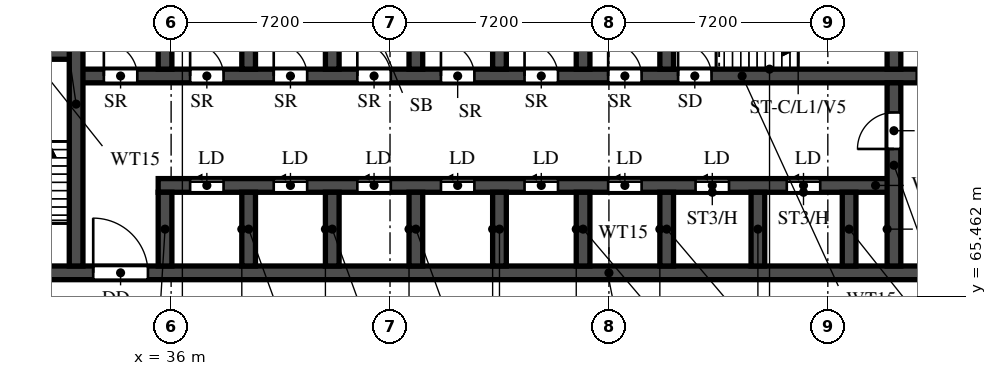
"""IFC4 building model, lengths in metres.
Left out: names, types, materials, properties, quantities, classifications, styles, units other than length and angle.
Written with IfcOpenShell. Run it as: python <this file> out.ifc"""

import sys

from ifc_helpers import new_model, si_unit, direction, frame, frame_2d, origin, place, context, subcontext, project, spatial, rectangle, extrude, element, fill, save


model = new_model("IFC4")
c1 = context("Model", 3, precision=1e-05, world=origin(), true_north=direction((0.0, 1.0)))
c2 = subcontext(c1, "Body", "Model", "MODEL_VIEW")
j1 = project(units=[si_unit("LENGTHUNIT", "METRE"), si_unit("PLANEANGLEUNIT", "RADIAN")], contexts=[c1])
p1 = place(None, origin())
s1 = spatial("IfcSite", under=j1, at=p1, CompositionType="ELEMENT")
p2 = place(p1, origin())
s2 = spatial("IfcBuilding", under=s1, at=p2, CompositionType="ELEMENT")
p3 = place(p2, origin())
s3 = spatial("IfcBuildingStorey", under=s2, at=p3, CompositionType="ELEMENT", Elevation=0.0)
p4 = place(p3, frame((29.7, 66.225, 0.0), z_axis=(0.0, 0.0, 1.0), x_axis=(1.0, 0.0, 0.0)))
e1 = element("IfcWall", 1, at=p4, inside=s3, PredefinedType="SHEAR", context=c2, shape_type="SweptSolid", body=[
    extrude(rectangle(XDim=41.4, YDim=0.45, at=frame_2d((20.7, 0.0))), origin(), (0.0, 0.0, 1.0), 7.4),
])
p5 = place(p4, frame((0.925, 0.0, 0.0)))
e2 = element("IfcOpeningElement", 2, at=p5, cuts=e1, PredefinedType="OPENING", context=c2, shape_type="SweptSolid", body=[
    extrude(rectangle(XDim=1.1, YDim=2.1, at=frame_2d((0.55, 1.05))), frame((0.0, 0.235, 0.0), z_axis=(0.0, -1.0, 0.0), x_axis=(1.0, 0.0, 0.0)), (0.0, 0.0, 1.0), 0.47),
])
p6 = place(p4, frame((3.738, 0.0, 0.0)))
e3 = element("IfcOpeningElement", 3, at=p6, cuts=e1, PredefinedType="OPENING", context=c2, shape_type="SweptSolid", body=[
    extrude(rectangle(XDim=1.8, YDim=2.1, at=frame_2d((0.9, 1.05))), frame((0.0, 0.235, 0.0), z_axis=(0.0, -1.0, 0.0), x_axis=(1.0, 0.0, 0.0)), (0.0, 0.0, 1.0), 0.47),
])
p7 = place(p3, frame((35.575, 69.1, 0.0), z_axis=(0.0, 0.0, 1.0), x_axis=(1.0, 0.0, 0.0)))
e4 = element("IfcWall", 4, at=p7, inside=s3, PredefinedType="SHEAR", context=c2, shape_type="SweptSolid", body=[
    extrude(rectangle(XDim=24.2, YDim=0.45, at=frame_2d((12.1, 0.0))), origin(), (0.0, 0.0, 1.0), 7.4),
])
p8 = place(p7, frame((1.05, 0.0, 0.0)))
e5 = element("IfcOpeningElement", 5, at=p8, cuts=e4, PredefinedType="OPENING", context=c2, shape_type="SweptSolid", body=[
    extrude(rectangle(XDim=1.1, YDim=2.1, at=frame_2d((0.55, 1.05))), frame((0.0, 0.235, 0.0), z_axis=(0.0, -1.0, 0.0), x_axis=(1.0, 0.0, 0.0)), (0.0, 0.0, 1.0), 0.47),
])
p9 = place(p7, frame((3.8, 0.0, 0.0)))
e6 = element("IfcOpeningElement", 6, at=p9, cuts=e4, PredefinedType="OPENING", context=c2, shape_type="SweptSolid", body=[
    extrude(rectangle(XDim=1.1, YDim=2.1, at=frame_2d((0.55, 1.05))), frame((0.0, 0.235, 0.0), z_axis=(0.0, -1.0, 0.0), x_axis=(1.0, 0.0, 0.0)), (0.0, 0.0, 1.0), 0.47),
])
p10 = place(p7, frame((6.55, 0.0, 0.0)))
e7 = element("IfcOpeningElement", 7, at=p10, cuts=e4, PredefinedType="OPENING", context=c2, shape_type="SweptSolid", body=[
    extrude(rectangle(XDim=1.1, YDim=2.1, at=frame_2d((0.55, 1.05))), frame((0.0, 0.235, 0.0), z_axis=(0.0, -1.0, 0.0), x_axis=(1.0, 0.0, 0.0)), (0.0, 0.0, 1.0), 0.47),
])
p11 = place(p7, frame((9.3, 0.0, 0.0)))
e8 = element("IfcOpeningElement", 8, at=p11, cuts=e4, PredefinedType="OPENING", context=c2, shape_type="SweptSolid", body=[
    extrude(rectangle(XDim=1.1, YDim=2.1, at=frame_2d((0.55, 1.05))), frame((0.0, 0.235, 0.0), z_axis=(0.0, -1.0, 0.0), x_axis=(1.0, 0.0, 0.0)), (0.0, 0.0, 1.0), 0.47),
])
p12 = place(p7, frame((12.05, 0.0, 0.0)))
e9 = element("IfcOpeningElement", 9, at=p12, cuts=e4, PredefinedType="OPENING", context=c2, shape_type="SweptSolid", body=[
    extrude(rectangle(XDim=1.1, YDim=2.1, at=frame_2d((0.55, 1.05))), frame((0.0, 0.235, 0.0), z_axis=(0.0, -1.0, 0.0), x_axis=(1.0, 0.0, 0.0)), (0.0, 0.0, 1.0), 0.47),
])
p13 = place(p7, frame((14.8, 0.0, 0.0)))
e10 = element("IfcOpeningElement", 10, at=p13, cuts=e4, PredefinedType="OPENING", context=c2, shape_type="SweptSolid", body=[
    extrude(rectangle(XDim=1.1, YDim=2.1, at=frame_2d((0.55, 1.05))), frame((0.0, 0.235, 0.0), z_axis=(0.0, -1.0, 0.0), x_axis=(1.0, 0.0, 0.0)), (0.0, 0.0, 1.0), 0.47),
])
p14 = place(p7, frame((17.675, 0.0, 0.0)))
e11 = element("IfcOpeningElement", 11, at=p14, cuts=e4, PredefinedType="OPENING", context=c2, shape_type="SweptSolid", body=[
    extrude(rectangle(XDim=1.1, YDim=2.1, at=frame_2d((0.55, 1.05))), frame((0.0, 0.235, 0.0), z_axis=(0.0, -1.0, 0.0), x_axis=(1.0, 0.0, 0.0)), (0.0, 0.0, 1.0), 0.47),
])
p15 = place(p7, frame((20.675, 0.0, 0.0)))
e12 = element("IfcOpeningElement", 12, at=p15, cuts=e4, PredefinedType="OPENING", context=c2, shape_type="SweptSolid", body=[
    extrude(rectangle(XDim=1.1, YDim=2.1, at=frame_2d((0.55, 1.05))), frame((0.0, 0.235, 0.0), z_axis=(0.0, -1.0, 0.0), x_axis=(1.0, 0.0, 0.0)), (0.0, 0.0, 1.0), 0.47),
])
p16 = place(p3, frame((32.875, 72.7, 0.0), z_axis=(0.0, 0.0, 1.0), x_axis=(1.0, 0.0, 0.0)))
e13 = element("IfcWall", 13, at=p16, inside=s3, PredefinedType="SHEAR", context=c2, shape_type="SweptSolid", body=[
    extrude(rectangle(XDim=35.05, YDim=0.45, at=frame_2d((17.525, 0.0))), origin(), (0.0, 0.0, 1.0), 7.4),
])
p17 = place(p16, frame((19.8, 0.0, 0.0)))
e14 = element("IfcOpeningElement", 14, at=p17, cuts=e13, PredefinedType="OPENING", context=c2, shape_type="SweptSolid", body=[
    extrude(rectangle(XDim=1.1, YDim=2.1, at=frame_2d((0.55, 1.05))), frame((0.0, 0.235, 0.0), z_axis=(0.0, -1.0, 0.0), x_axis=(1.0, 0.0, 0.0)), (0.0, 0.0, 1.0), 0.47),
])
p18 = place(p16, frame((27.65, 0.0, 0.0)))
e15 = element("IfcOpeningElement", 15, at=p18, cuts=e13, PredefinedType="OPENING", context=c2, shape_type="SweptSolid", body=[
    extrude(rectangle(XDim=1.1, YDim=2.1, at=frame_2d((0.55, 1.05))), frame((0.0, 0.235, 0.0), z_axis=(0.0, -1.0, 0.0), x_axis=(1.0, 0.0, 0.0)), (0.0, 0.0, 1.0), 0.47),
])
p19 = place(p16, frame((30.25, 0.0, 0.0)))
e16 = element("IfcOpeningElement", 16, at=p19, cuts=e13, PredefinedType="OPENING", context=c2, shape_type="SweptSolid", body=[
    extrude(rectangle(XDim=1.1, YDim=2.1, at=frame_2d((0.55, 1.05))), frame((0.0, 0.235, 0.0), z_axis=(0.0, -1.0, 0.0), x_axis=(1.0, 0.0, 0.0)), (0.0, 0.0, 1.0), 0.47),
])
p20 = place(p16, frame((3.75, 0.0, 0.0)))
e17 = element("IfcOpeningElement", 17, at=p20, cuts=e13, PredefinedType="OPENING", context=c2, shape_type="SweptSolid", body=[
    extrude(rectangle(XDim=1.1, YDim=2.1, at=frame_2d((0.55, 1.05))), frame((0.0, 0.235, 0.0), z_axis=(0.0, -1.0, 0.0), x_axis=(1.0, 0.0, 0.0)), (0.0, 0.0, 1.0), 0.47),
])
p21 = place(p16, frame((6.5, 0.0, 0.0)))
e18 = element("IfcOpeningElement", 18, at=p21, cuts=e13, PredefinedType="OPENING", context=c2, shape_type="SweptSolid", body=[
    extrude(rectangle(XDim=1.1, YDim=2.1, at=frame_2d((0.55, 1.05))), frame((0.0, 0.235, 0.0), z_axis=(0.0, -1.0, 0.0), x_axis=(1.0, 0.0, 0.0)), (0.0, 0.0, 1.0), 0.47),
])
p22 = place(p16, frame((9.25, 0.0, 0.0)))
e19 = element("IfcOpeningElement", 19, at=p22, cuts=e13, PredefinedType="OPENING", context=c2, shape_type="SweptSolid", body=[
    extrude(rectangle(XDim=1.1, YDim=2.1, at=frame_2d((0.55, 1.05))), frame((0.0, 0.235, 0.0), z_axis=(0.0, -1.0, 0.0), x_axis=(1.0, 0.0, 0.0)), (0.0, 0.0, 1.0), 0.47),
])
p23 = place(p16, frame((12.0, 0.0, 0.0)))
e20 = element("IfcOpeningElement", 20, at=p23, cuts=e13, PredefinedType="OPENING", context=c2, shape_type="SweptSolid", body=[
    extrude(rectangle(XDim=1.1, YDim=2.1, at=frame_2d((0.55, 1.05))), frame((0.0, 0.235, 0.0), z_axis=(0.0, -1.0, 0.0), x_axis=(1.0, 0.0, 0.0)), (0.0, 0.0, 1.0), 0.47),
])
p24 = place(p16, frame((14.75, 0.0, 0.0)))
e21 = element("IfcOpeningElement", 21, at=p24, cuts=e13, PredefinedType="OPENING", context=c2, shape_type="SweptSolid", body=[
    extrude(rectangle(XDim=1.1, YDim=2.1, at=frame_2d((0.55, 1.05))), frame((0.0, 0.235, 0.0), z_axis=(0.0, -1.0, 0.0), x_axis=(1.0, 0.0, 0.0)), (0.0, 0.0, 1.0), 0.47),
])
p25 = place(p16, frame((17.5, 0.0, 0.0)))
e22 = element("IfcOpeningElement", 22, at=p25, cuts=e13, PredefinedType="OPENING", context=c2, shape_type="SweptSolid", body=[
    extrude(rectangle(XDim=1.1, YDim=2.1, at=frame_2d((0.55, 1.05))), frame((0.0, 0.235, 0.0), z_axis=(0.0, -1.0, 0.0), x_axis=(1.0, 0.0, 0.0)), (0.0, 0.0, 1.0), 0.47),
])
p26 = place(p16, frame((0.913, 0.0, 0.0)))
e23 = element("IfcOpeningElement", 23, at=p26, cuts=e13, PredefinedType="OPENING", context=c2, shape_type="SweptSolid", body=[
    extrude(rectangle(XDim=1.1, YDim=2.1, at=frame_2d((0.55, 1.05))), frame((0.0, 0.235, 0.0), z_axis=(0.0, -1.0, 0.0), x_axis=(1.0, 0.0, 0.0)), (0.0, 0.0, 1.0), 0.47),
])
p27 = place(p3, frame((29.7, 73.475, 0.0), z_axis=(0.0, 0.0, 1.0), x_axis=(1.0, 0.0, 0.0)))
e24 = element("IfcWall", 24, at=p27, inside=s3, PredefinedType="SHEAR", context=c2, shape_type="SweptSolid", body=[
    extrude(rectangle(XDim=3.175, YDim=0.45, at=frame_2d((1.587, 0.0))), origin(), (0.0, 0.0, 1.0), 7.4),
])
p28 = place(p3, frame((32.875, 66.45, 0.0), z_axis=(0.0, 0.0, 1.0), x_axis=(0.0, 1.0, 0.0)))
e25 = element("IfcWall", 25, at=p28, inside=s3, PredefinedType="SHEAR", context=c2, shape_type="SweptSolid", body=[
    extrude(rectangle(XDim=10.65, YDim=0.45, at=frame_2d((5.325, 0.0))), origin(), (0.0, 0.0, 1.0), 7.4),
])
p29 = place(p3, frame((59.775, 66.45, 0.0), z_axis=(0.0, 0.0, 1.0), x_axis=(0.0, 1.0, 0.0)))
e26 = element("IfcWall", 26, at=p29, inside=s3, PredefinedType="SHEAR", context=c2, shape_type="SweptSolid", body=[
    extrude(rectangle(XDim=6.025, YDim=0.45, at=frame_2d((3.013, 0.0))), origin(), (0.0, 0.0, 1.0), 7.4),
])
p30 = place(p29, frame((3.85, 0.0, 0.0)))
e27 = element("IfcOpeningElement", 27, at=p30, cuts=e26, PredefinedType="OPENING", context=c2, shape_type="SweptSolid", body=[
    extrude(rectangle(XDim=1.2, YDim=2.1, at=frame_2d((0.6, 1.05))), frame((0.0, 0.235, 0.0), z_axis=(0.0, -1.0, 0.0), x_axis=(1.0, 0.0, 0.0)), (0.0, 0.0, 1.0), 0.47),
])
p31 = place(p3, frame((59.775, 72.925, 0.0), z_axis=(0.0, 0.0, 1.0), x_axis=(0.0, 1.0, 0.0)))
e28 = element("IfcWall", 28, at=p31, inside=s3, PredefinedType="SHEAR", context=c2, shape_type="SweptSolid", body=[
    extrude(rectangle(XDim=2.95, YDim=0.45, at=frame_2d((1.475, 0.0))), origin(), (0.0, 0.0, 1.0), 7.4),
])
for number, where, z_axis, x_axis in (
    (29, (35.8, 66.45, 0.0), (0.0, 0.0, 1.0), (0.0, 1.0, 0.0)),
    (30, (38.55, 66.45, 0.0), (0.0, 0.0, 1.0), (0.0, 1.0, 0.0)),
    (31, (41.3, 66.45, 0.0), (0.0, 0.0, 1.0), (0.0, 1.0, 0.0)),
    (32, (44.05, 66.45, 0.0), (0.0, 0.0, 1.0), (0.0, 1.0, 0.0)),
    (33, (46.8, 66.45, 0.0), (0.0, 0.0, 1.0), (0.0, 1.0, 0.0)),
    (34, (49.55, 66.45, 0.0), (0.0, 0.0, 1.0), (0.0, 1.0, 0.0)),
    (35, (52.3, 66.45, 0.0), (0.0, 0.0, 1.0), (0.0, 1.0, 0.0)),
    (36, (55.3, 66.45, 0.0), (0.0, 0.0, 1.0), (0.0, 1.0, 0.0)),
    (37, (58.3, 66.45, 0.0), (0.0, 0.0, 1.0), (0.0, 1.0, 0.0)),
):
    element("IfcWall", number, at=place(p3, frame(where, z_axis=z_axis, x_axis=x_axis)), inside=s3, PredefinedType="SHEAR", context=c2, shape_type="SweptSolid", body=[
        extrude(rectangle(XDim=2.425, YDim=0.45, at=frame_2d((1.212, 0.0))), origin(), (0.0, 0.0, 1.0), 7.4),
    ])
for number, where, z_axis, x_axis in (
    (38, (35.8, 72.925, 0.0), (0.0, 0.0, 1.0), (0.0, 1.0, 0.0)),
    (39, (38.55, 72.925, 0.0), (0.0, 0.0, 1.0), (0.0, 1.0, 0.0)),
    (40, (41.3, 72.925, 0.0), (0.0, 0.0, 1.0), (0.0, 1.0, 0.0)),
    (41, (44.05, 72.925, 0.0), (0.0, 0.0, 1.0), (0.0, 1.0, 0.0)),
    (42, (46.8, 72.925, 0.0), (0.0, 0.0, 1.0), (0.0, 1.0, 0.0)),
    (43, (49.55, 72.925, 0.0), (0.0, 0.0, 1.0), (0.0, 1.0, 0.0)),
    (44, (52.3, 72.925, 0.0), (0.0, 0.0, 1.0), (0.0, 1.0, 0.0)),
):
    element("IfcWall", number, at=place(p3, frame(where, z_axis=z_axis, x_axis=x_axis)), inside=s3, PredefinedType="SHEAR", context=c2, shape_type="SweptSolid", body=[
        extrude(rectangle(XDim=2.95, YDim=0.45, at=frame_2d((1.475, 0.0))), origin(), (0.0, 0.0, 1.0), 7.4),
    ])
p32 = place(p17, origin())
e45 = element("IfcDoor", 45, at=p32, inside=s3, OperationType="SINGLE_SWING_LEFT", PredefinedType="DOOR", context=c2, shape_type="SweptSolid", body=[
    extrude(rectangle(XDim=1.1, YDim=2.1, at=frame_2d((0.55, 1.05))), frame((0.0, 0.025, 0.0), z_axis=(0.0, -1.0, 0.0), x_axis=(1.0, 0.0, 0.0)), (0.0, 0.0, 1.0), 0.05),
])
fill(e14, e45)
p33 = place(p6, origin())
e46 = element("IfcDoor", 46, at=p33, inside=s3, OperationType="DOUBLE_DOOR_SINGLE_SWING", PredefinedType="DOOR", context=c2, shape_type="SweptSolid", body=[
    extrude(rectangle(XDim=1.8, YDim=2.1, at=frame_2d((0.9, 1.05))), frame((0.0, 0.025, 0.0), z_axis=(0.0, -1.0, 0.0), x_axis=(1.0, 0.0, 0.0)), (0.0, 0.0, 1.0), 0.05),
])
fill(e3, e46)
p34 = place(p30, origin())
e47 = element("IfcDoor", 47, at=p34, inside=s3, OperationType="SINGLE_SWING_RIGHT", PredefinedType="DOOR", context=c2, shape_type="SweptSolid", body=[
    extrude(rectangle(XDim=1.2, YDim=2.1, at=frame_2d((0.6, 1.05))), frame((0.0, 0.025, 0.0), z_axis=(0.0, -1.0, 0.0), x_axis=(1.0, 0.0, 0.0)), (0.0, 0.0, 1.0), 0.05),
])
fill(e27, e47)
p35 = place(p18, origin())
e48 = element("IfcDoor", 48, at=p35, inside=s3, OperationType="SLIDING_TO_LEFT", PredefinedType="DOOR", context=c2, shape_type="SweptSolid", body=[
    extrude(rectangle(XDim=1.1, YDim=2.1, at=frame_2d((0.55, 1.05))), frame((0.0, 0.025, 0.0), z_axis=(0.0, -1.0, 0.0), x_axis=(1.0, 0.0, 0.0)), (0.0, 0.0, 1.0), 0.05),
])
fill(e15, e48)
p36 = place(p8, origin())
e49 = element("IfcDoor", 49, at=p36, inside=s3, OperationType="SLIDING_TO_LEFT", PredefinedType="DOOR", context=c2, shape_type="SweptSolid", body=[
    extrude(rectangle(XDim=1.1, YDim=2.1, at=frame_2d((0.55, 1.05))), frame((0.0, 0.025, 0.0), z_axis=(0.0, -1.0, 0.0), x_axis=(1.0, 0.0, 0.0)), (0.0, 0.0, 1.0), 0.05),
])
fill(e5, e49)
p37 = place(p9, origin())
e50 = element("IfcDoor", 50, at=p37, inside=s3, OperationType="SLIDING_TO_LEFT", PredefinedType="DOOR", context=c2, shape_type="SweptSolid", body=[
    extrude(rectangle(XDim=1.1, YDim=2.1, at=frame_2d((0.55, 1.05))), frame((0.0, 0.025, 0.0), z_axis=(0.0, -1.0, 0.0), x_axis=(1.0, 0.0, 0.0)), (0.0, 0.0, 1.0), 0.05),
])
fill(e6, e50)
p38 = place(p10, origin())
e51 = element("IfcDoor", 51, at=p38, inside=s3, OperationType="SLIDING_TO_LEFT", PredefinedType="DOOR", context=c2, shape_type="SweptSolid", body=[
    extrude(rectangle(XDim=1.1, YDim=2.1, at=frame_2d((0.55, 1.05))), frame((0.0, 0.025, 0.0), z_axis=(0.0, -1.0, 0.0), x_axis=(1.0, 0.0, 0.0)), (0.0, 0.0, 1.0), 0.05),
])
fill(e7, e51)
p39 = place(p11, origin())
e52 = element("IfcDoor", 52, at=p39, inside=s3, OperationType="SLIDING_TO_LEFT", PredefinedType="DOOR", context=c2, shape_type="SweptSolid", body=[
    extrude(rectangle(XDim=1.1, YDim=2.1, at=frame_2d((0.55, 1.05))), frame((0.0, 0.025, 0.0), z_axis=(0.0, -1.0, 0.0), x_axis=(1.0, 0.0, 0.0)), (0.0, 0.0, 1.0), 0.05),
])
fill(e8, e52)
p40 = place(p12, origin())
e53 = element("IfcDoor", 53, at=p40, inside=s3, OperationType="SLIDING_TO_LEFT", PredefinedType="DOOR", context=c2, shape_type="SweptSolid", body=[
    extrude(rectangle(XDim=1.1, YDim=2.1, at=frame_2d((0.55, 1.05))), frame((0.0, 0.025, 0.0), z_axis=(0.0, -1.0, 0.0), x_axis=(1.0, 0.0, 0.0)), (0.0, 0.0, 1.0), 0.05),
])
fill(e9, e53)
p41 = place(p13, origin())
e54 = element("IfcDoor", 54, at=p41, inside=s3, OperationType="SLIDING_TO_LEFT", PredefinedType="DOOR", context=c2, shape_type="SweptSolid", body=[
    extrude(rectangle(XDim=1.1, YDim=2.1, at=frame_2d((0.55, 1.05))), frame((0.0, 0.025, 0.0), z_axis=(0.0, -1.0, 0.0), x_axis=(1.0, 0.0, 0.0)), (0.0, 0.0, 1.0), 0.05),
])
fill(e10, e54)
p42 = place(p14, origin())
e55 = element("IfcDoor", 55, at=p42, inside=s3, OperationType="SLIDING_TO_LEFT", PredefinedType="DOOR", context=c2, shape_type="SweptSolid", body=[
    extrude(rectangle(XDim=1.1, YDim=2.1, at=frame_2d((0.55, 1.05))), frame((0.0, 0.025, 0.0), z_axis=(0.0, -1.0, 0.0), x_axis=(1.0, 0.0, 0.0)), (0.0, 0.0, 1.0), 0.05),
])
fill(e11, e55)
p43 = place(p15, origin())
e56 = element("IfcDoor", 56, at=p43, inside=s3, OperationType="SLIDING_TO_LEFT", PredefinedType="DOOR", context=c2, shape_type="SweptSolid", body=[
    extrude(rectangle(XDim=1.1, YDim=2.1, at=frame_2d((0.55, 1.05))), frame((0.0, 0.025, 0.0), z_axis=(0.0, -1.0, 0.0), x_axis=(1.0, 0.0, 0.0)), (0.0, 0.0, 1.0), 0.05),
])
fill(e12, e56)
p44 = place(p20, origin())
e57 = element("IfcDoor", 57, at=p44, inside=s3, OperationType="SINGLE_SWING_LEFT", PredefinedType="DOOR", context=c2, shape_type="SweptSolid", body=[
    extrude(rectangle(XDim=1.1, YDim=2.1, at=frame_2d((0.55, 1.05))), frame((0.0, 0.025, 0.0), z_axis=(0.0, -1.0, 0.0), x_axis=(1.0, 0.0, 0.0)), (0.0, 0.0, 1.0), 0.05),
])
fill(e17, e57)
p45 = place(p21, origin())
e58 = element("IfcDoor", 58, at=p45, inside=s3, OperationType="SINGLE_SWING_LEFT", PredefinedType="DOOR", context=c2, shape_type="SweptSolid", body=[
    extrude(rectangle(XDim=1.1, YDim=2.1, at=frame_2d((0.55, 1.05))), frame((0.0, 0.025, 0.0), z_axis=(0.0, -1.0, 0.0), x_axis=(1.0, 0.0, 0.0)), (0.0, 0.0, 1.0), 0.05),
])
fill(e18, e58)
p46 = place(p22, origin())
e59 = element("IfcDoor", 59, at=p46, inside=s3, OperationType="SINGLE_SWING_LEFT", PredefinedType="DOOR", context=c2, shape_type="SweptSolid", body=[
    extrude(rectangle(XDim=1.1, YDim=2.1, at=frame_2d((0.55, 1.05))), frame((0.0, 0.025, 0.0), z_axis=(0.0, -1.0, 0.0), x_axis=(1.0, 0.0, 0.0)), (0.0, 0.0, 1.0), 0.05),
])
fill(e19, e59)
p47 = place(p23, origin())
e60 = element("IfcDoor", 60, at=p47, inside=s3, OperationType="SINGLE_SWING_LEFT", PredefinedType="DOOR", context=c2, shape_type="SweptSolid", body=[
    extrude(rectangle(XDim=1.1, YDim=2.1, at=frame_2d((0.55, 1.05))), frame((0.0, 0.025, 0.0), z_axis=(0.0, -1.0, 0.0), x_axis=(1.0, 0.0, 0.0)), (0.0, 0.0, 1.0), 0.05),
])
fill(e20, e60)
p48 = place(p24, origin())
e61 = element("IfcDoor", 61, at=p48, inside=s3, OperationType="SINGLE_SWING_LEFT", PredefinedType="DOOR", context=c2, shape_type="SweptSolid", body=[
    extrude(rectangle(XDim=1.1, YDim=2.1, at=frame_2d((0.55, 1.05))), frame((0.0, 0.025, 0.0), z_axis=(0.0, -1.0, 0.0), x_axis=(1.0, 0.0, 0.0)), (0.0, 0.0, 1.0), 0.05),
])
fill(e21, e61)
p49 = place(p25, origin())
e62 = element("IfcDoor", 62, at=p49, inside=s3, OperationType="SINGLE_SWING_LEFT", PredefinedType="DOOR", context=c2, shape_type="SweptSolid", body=[
    extrude(rectangle(XDim=1.1, YDim=2.1, at=frame_2d((0.55, 1.05))), frame((0.0, 0.025, 0.0), z_axis=(0.0, -1.0, 0.0), x_axis=(1.0, 0.0, 0.0)), (0.0, 0.0, 1.0), 0.05),
])
fill(e22, e62)
p50 = place(p26, origin())
e63 = element("IfcDoor", 63, at=p50, inside=s3, OperationType="SINGLE_SWING_LEFT", PredefinedType="DOOR", context=c2, shape_type="SweptSolid", body=[
    extrude(rectangle(XDim=1.1, YDim=2.1, at=frame_2d((0.55, 1.05))), frame((0.0, 0.025, 0.0), z_axis=(0.0, -1.0, 0.0), x_axis=(1.0, 0.0, 0.0)), (0.0, 0.0, 1.0), 0.05),
])
fill(e23, e63)
save(model, sys.argv[1])
